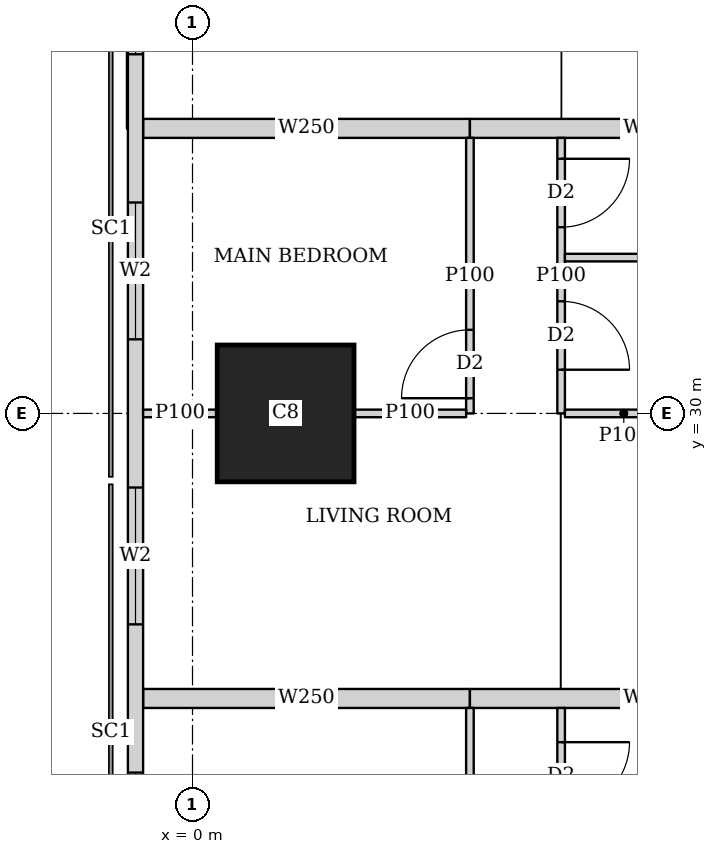
"""IFC4 building model, lengths in metres.
Left out: names, types, materials, properties, quantities, classifications, styles, units other than length and angle.
Written with IfcOpenShell. Run it as: python <this file> out.ifc"""

import sys

from ifc_helpers import new_model, si_unit, direction, frame, frame_2d, origin, origin_2d, place, context, subcontext, project, spatial, rectangle, extrude, element, fill, save


model = new_model("IFC4")
c1 = context("Model", 3, precision=1e-05, world=origin(), true_north=direction((0.0, 1.0)))
c2 = subcontext(c1, "Body", "Model", "MODEL_VIEW")
j1 = project(units=[si_unit("LENGTHUNIT", "METRE"), si_unit("PLANEANGLEUNIT", "RADIAN")], contexts=[c1])
p1 = place(None, origin())
s1 = spatial("IfcSite", under=j1, at=p1, CompositionType="ELEMENT")
p2 = place(p1, origin())
s2 = spatial("IfcBuilding", under=s1, at=p2, CompositionType="ELEMENT")
p3 = place(p2, frame((0.0, 0.0, 135.8)))
s3 = spatial("IfcBuildingStorey", under=s2, at=p3, CompositionType="ELEMENT", Elevation=135.8)
p4 = place(p3, frame((1.225, 30.0, 0.0), z_axis=(0.0, 0.0, 1.0), x_axis=(1.0, 0.0, 0.0)))
e1 = element("IfcColumn", 1, at=p4, inside=s3, PredefinedType="COLUMN", context=c2, shape_type="SweptSolid", body=[
    extrude(rectangle(XDim=1.8, YDim=1.8, at=origin_2d()), origin(), (0.0, 0.0, 1.0), 3.75),
])
p5 = place(p3, frame((-0.75, 42.837, 0.0), z_axis=(0.0, 0.0, 1.0), x_axis=(0.0, -1.0, 0.0)))
e2 = element("IfcWall", 2, at=p5, inside=s3, PredefinedType="SOLIDWALL", context=c2, shape_type="SweptSolid", body=[
    extrude(rectangle(XDim=40.674, YDim=0.2, at=frame_2d((20.337, 0.0))), origin(), (0.0, 0.0, 1.0), 3.5),
])
p6 = place(p5, frame((1.78, 0.0, 0.9)))
e3 = element("IfcOpeningElement", 3, at=p6, cuts=e2, PredefinedType="OPENING", context=c2, shape_type="SweptSolid", body=[
    extrude(rectangle(XDim=1.8, YDim=1.5, at=frame_2d((0.9, 0.75))), frame((0.0, 0.11, 0.0), z_axis=(0.0, -1.0, 0.0), x_axis=(1.0, 0.0, 0.0)), (0.0, 0.0, 1.0), 0.22),
])
p7 = place(p5, frame((6.312, 0.0, 0.9)))
e4 = element("IfcOpeningElement", 4, at=p7, cuts=e2, PredefinedType="OPENING", context=c2, shape_type="SweptSolid", body=[
    extrude(rectangle(XDim=1.8, YDim=1.5, at=frame_2d((0.9, 0.75))), frame((0.0, 0.11, 0.0), z_axis=(0.0, -1.0, 0.0), x_axis=(1.0, 0.0, 0.0)), (0.0, 0.0, 1.0), 0.22),
])
p8 = place(p5, frame((10.062, 0.0, 0.9)))
e5 = element("IfcOpeningElement", 5, at=p8, cuts=e2, PredefinedType="OPENING", context=c2, shape_type="SweptSolid", body=[
    extrude(rectangle(XDim=1.8, YDim=1.5, at=frame_2d((0.9, 0.75))), frame((0.0, 0.11, 0.0), z_axis=(0.0, -1.0, 0.0), x_axis=(1.0, 0.0, 0.0)), (0.0, 0.0, 1.0), 0.22),
])
p9 = place(p5, frame((13.812, 0.0, 0.9)))
e6 = element("IfcOpeningElement", 6, at=p9, cuts=e2, PredefinedType="OPENING", context=c2, shape_type="SweptSolid", body=[
    extrude(rectangle(XDim=1.8, YDim=1.5, at=frame_2d((0.9, 0.75))), frame((0.0, 0.11, 0.0), z_axis=(0.0, -1.0, 0.0), x_axis=(1.0, 0.0, 0.0)), (0.0, 0.0, 1.0), 0.22),
])
p10 = place(p5, frame((17.562, 0.0, 0.9)))
e7 = element("IfcOpeningElement", 7, at=p10, cuts=e2, PredefinedType="OPENING", context=c2, shape_type="SweptSolid", body=[
    extrude(rectangle(XDim=1.8, YDim=1.5, at=frame_2d((0.9, 0.75))), frame((0.0, 0.11, 0.0), z_axis=(0.0, -1.0, 0.0), x_axis=(1.0, 0.0, 0.0)), (0.0, 0.0, 1.0), 0.22),
])
p11 = place(p5, frame((21.312, 0.0, 0.9)))
e8 = element("IfcOpeningElement", 8, at=p11, cuts=e2, PredefinedType="OPENING", context=c2, shape_type="SweptSolid", body=[
    extrude(rectangle(XDim=1.8, YDim=1.5, at=frame_2d((0.9, 0.75))), frame((0.0, 0.11, 0.0), z_axis=(0.0, -1.0, 0.0), x_axis=(1.0, 0.0, 0.0)), (0.0, 0.0, 1.0), 0.22),
])
p12 = place(p5, frame((25.062, 0.0, 0.9)))
e9 = element("IfcOpeningElement", 9, at=p12, cuts=e2, PredefinedType="OPENING", context=c2, shape_type="SweptSolid", body=[
    extrude(rectangle(XDim=1.8, YDim=1.5, at=frame_2d((0.9, 0.75))), frame((0.0, 0.11, 0.0), z_axis=(0.0, -1.0, 0.0), x_axis=(1.0, 0.0, 0.0)), (0.0, 0.0, 1.0), 0.22),
])
p13 = place(p5, frame((28.812, 0.0, 0.9)))
e10 = element("IfcOpeningElement", 10, at=p13, cuts=e2, PredefinedType="OPENING", context=c2, shape_type="SweptSolid", body=[
    extrude(rectangle(XDim=1.8, YDim=1.5, at=frame_2d((0.9, 0.75))), frame((0.0, 0.11, 0.0), z_axis=(0.0, -1.0, 0.0), x_axis=(1.0, 0.0, 0.0)), (0.0, 0.0, 1.0), 0.22),
])
p14 = place(p5, frame((32.562, 0.0, 0.9)))
e11 = element("IfcOpeningElement", 11, at=p14, cuts=e2, PredefinedType="OPENING", context=c2, shape_type="SweptSolid", body=[
    extrude(rectangle(XDim=1.8, YDim=1.5, at=frame_2d((0.9, 0.75))), frame((0.0, 0.11, 0.0), z_axis=(0.0, -1.0, 0.0), x_axis=(1.0, 0.0, 0.0)), (0.0, 0.0, 1.0), 0.22),
])
p15 = place(p5, frame((37.094, 0.0, 0.9)))
e12 = element("IfcOpeningElement", 12, at=p15, cuts=e2, PredefinedType="OPENING", context=c2, shape_type="SweptSolid", body=[
    extrude(rectangle(XDim=1.8, YDim=1.5, at=frame_2d((0.9, 0.75))), frame((0.0, 0.11, 0.0), z_axis=(0.0, -1.0, 0.0), x_axis=(1.0, 0.0, 0.0)), (0.0, 0.0, 1.0), 0.22),
])
p16 = place(p3, frame((3.65, 15.0, 0.0), z_axis=(0.0, 0.0, 1.0), x_axis=(0.0, 1.0, 0.0)))
e13 = element("IfcWall", 13, at=p16, inside=s3, PredefinedType="PARTITIONING", context=c2, shape_type="SweptSolid", body=[
    extrude(rectangle(XDim=11.125, YDim=0.1, at=frame_2d((5.562, 0.0))), origin(), (0.0, 0.0, 1.0), 3.5),
])
p17 = place(p16, frame((0.2, 0.0, 0.0)))
e14 = element("IfcOpeningElement", 14, at=p17, cuts=e13, PredefinedType="OPENING", context=c2, shape_type="SweptSolid", body=[
    extrude(rectangle(XDim=0.9, YDim=2.1, at=frame_2d((0.45, 1.05))), frame((0.0, 0.06, 0.0), z_axis=(0.0, -1.0, 0.0), x_axis=(1.0, 0.0, 0.0)), (0.0, 0.0, 1.0), 0.12),
])
p18 = place(p16, frame((3.95, 0.0, 0.0)))
e15 = element("IfcOpeningElement", 15, at=p18, cuts=e13, PredefinedType="OPENING", context=c2, shape_type="SweptSolid", body=[
    extrude(rectangle(XDim=0.9, YDim=2.1, at=frame_2d((0.45, 1.05))), frame((0.0, 0.06, 0.0), z_axis=(0.0, -1.0, 0.0), x_axis=(1.0, 0.0, 0.0)), (0.0, 0.0, 1.0), 0.12),
])
p19 = place(p16, frame((7.7, 0.0, 0.0)))
e16 = element("IfcOpeningElement", 16, at=p19, cuts=e13, PredefinedType="OPENING", context=c2, shape_type="SweptSolid", body=[
    extrude(rectangle(XDim=0.9, YDim=2.1, at=frame_2d((0.45, 1.05))), frame((0.0, 0.06, 0.0), z_axis=(0.0, -1.0, 0.0), x_axis=(1.0, 0.0, 0.0)), (0.0, 0.0, 1.0), 0.12),
])
p20 = place(p3, frame((4.85, 15.0, 0.0), z_axis=(0.0, 0.0, 1.0), x_axis=(0.0, 1.0, 0.0)))
e17 = element("IfcWall", 17, at=p20, inside=s3, PredefinedType="PARTITIONING", context=c2, shape_type="SweptSolid", body=[
    extrude(rectangle(XDim=11.125, YDim=0.1, at=frame_2d((5.562, 0.0))), origin(), (0.0, 0.0, 1.0), 3.5),
])
p21 = place(p20, frame((0.575, 0.0, 0.0)))
e18 = element("IfcOpeningElement", 18, at=p21, cuts=e17, PredefinedType="OPENING", context=c2, shape_type="SweptSolid", body=[
    extrude(rectangle(XDim=0.9, YDim=2.1, at=frame_2d((0.45, 1.05))), frame((0.0, 0.06, 0.0), z_axis=(0.0, -1.0, 0.0), x_axis=(1.0, 0.0, 0.0)), (0.0, 0.0, 1.0), 0.12),
])
p22 = place(p20, frame((4.1, 0.0, 0.0)))
e19 = element("IfcOpeningElement", 19, at=p22, cuts=e17, PredefinedType="OPENING", context=c2, shape_type="SweptSolid", body=[
    extrude(rectangle(XDim=0.9, YDim=2.1, at=frame_2d((0.45, 1.05))), frame((0.0, 0.06, 0.0), z_axis=(0.0, -1.0, 0.0), x_axis=(1.0, 0.0, 0.0)), (0.0, 0.0, 1.0), 0.12),
])
p23 = place(p20, frame((7.9, 0.0, 0.0)))
e20 = element("IfcOpeningElement", 20, at=p23, cuts=e17, PredefinedType="OPENING", context=c2, shape_type="SweptSolid", body=[
    extrude(rectangle(XDim=0.9, YDim=2.1, at=frame_2d((0.45, 1.05))), frame((0.0, 0.06, 0.0), z_axis=(0.0, -1.0, 0.0), x_axis=(1.0, 0.0, 0.0)), (0.0, 0.0, 1.0), 0.12),
])
p24 = place(p20, frame((2.45, 0.0, 0.0)))
e21 = element("IfcOpeningElement", 21, at=p24, cuts=e17, PredefinedType="OPENING", context=c2, shape_type="SweptSolid", body=[
    extrude(rectangle(XDim=0.9, YDim=2.1, at=frame_2d((0.45, 1.05))), frame((0.0, 0.06, 0.0), z_axis=(0.0, -1.0, 0.0), x_axis=(1.0, 0.0, 0.0)), (0.0, 0.0, 1.0), 0.12),
])
p25 = place(p20, frame((5.975, 0.0, 0.0)))
e22 = element("IfcOpeningElement", 22, at=p25, cuts=e17, PredefinedType="OPENING", context=c2, shape_type="SweptSolid", body=[
    extrude(rectangle(XDim=0.9, YDim=2.1, at=frame_2d((0.45, 1.05))), frame((0.0, 0.06, 0.0), z_axis=(0.0, -1.0, 0.0), x_axis=(1.0, 0.0, 0.0)), (0.0, 0.0, 1.0), 0.12),
])
p26 = place(p20, frame((9.775, 0.0, 0.0)))
e23 = element("IfcOpeningElement", 23, at=p26, cuts=e17, PredefinedType="OPENING", context=c2, shape_type="SweptSolid", body=[
    extrude(rectangle(XDim=0.9, YDim=2.1, at=frame_2d((0.45, 1.05))), frame((0.0, 0.06, 0.0), z_axis=(0.0, -1.0, 0.0), x_axis=(1.0, 0.0, 0.0)), (0.0, 0.0, 1.0), 0.12),
])
p27 = place(p3, frame((3.65, 30.0, 0.0), z_axis=(0.0, 0.0, 1.0), x_axis=(0.0, 1.0, 0.0)))
e24 = element("IfcWall", 24, at=p27, inside=s3, PredefinedType="PARTITIONING", context=c2, shape_type="SweptSolid", body=[
    extrude(rectangle(XDim=3.625, YDim=0.1, at=frame_2d((1.812, 0.0))), origin(), (0.0, 0.0, 1.0), 3.5),
])
p28 = place(p27, frame((0.2, 0.0, 0.0)))
e25 = element("IfcOpeningElement", 25, at=p28, cuts=e24, PredefinedType="OPENING", context=c2, shape_type="SweptSolid", body=[
    extrude(rectangle(XDim=0.9, YDim=2.1, at=frame_2d((0.45, 1.05))), frame((0.0, 0.06, 0.0), z_axis=(0.0, -1.0, 0.0), x_axis=(1.0, 0.0, 0.0)), (0.0, 0.0, 1.0), 0.12),
])
p29 = place(p3, frame((4.85, 30.0, 0.0), z_axis=(0.0, 0.0, 1.0), x_axis=(0.0, 1.0, 0.0)))
e26 = element("IfcWall", 26, at=p29, inside=s3, PredefinedType="PARTITIONING", context=c2, shape_type="SweptSolid", body=[
    extrude(rectangle(XDim=3.625, YDim=0.1, at=frame_2d((1.812, 0.0))), origin(), (0.0, 0.0, 1.0), 3.5),
])
p30 = place(p29, frame((0.575, 0.0, 0.0)))
e27 = element("IfcOpeningElement", 27, at=p30, cuts=e26, PredefinedType="OPENING", context=c2, shape_type="SweptSolid", body=[
    extrude(rectangle(XDim=0.9, YDim=2.1, at=frame_2d((0.45, 1.05))), frame((0.0, 0.06, 0.0), z_axis=(0.0, -1.0, 0.0), x_axis=(1.0, 0.0, 0.0)), (0.0, 0.0, 1.0), 0.12),
])
p31 = place(p29, frame((2.45, 0.0, 0.0)))
e28 = element("IfcOpeningElement", 28, at=p31, cuts=e26, PredefinedType="OPENING", context=c2, shape_type="SweptSolid", body=[
    extrude(rectangle(XDim=0.9, YDim=2.1, at=frame_2d((0.45, 1.05))), frame((0.0, 0.06, 0.0), z_axis=(0.0, -1.0, 0.0), x_axis=(1.0, 0.0, 0.0)), (0.0, 0.0, 1.0), 0.12),
])
p32 = place(p3, frame((-0.65, 30.0, 0.0), z_axis=(0.0, 0.0, 1.0), x_axis=(1.0, 0.0, 0.0)))
e29 = element("IfcWall", 29, at=p32, inside=s3, PredefinedType="PARTITIONING", context=c2, shape_type="SweptSolid", body=[
    extrude(rectangle(XDim=0.974, YDim=0.1, at=frame_2d((0.487, 0.0))), origin(), (0.0, 0.0, 1.0), 3.5),
])
p33 = place(p3, frame((2.126, 30.0, 0.0), z_axis=(0.0, 0.0, 1.0), x_axis=(1.0, 0.0, 0.0)))
e30 = element("IfcWall", 30, at=p33, inside=s3, PredefinedType="PARTITIONING", context=c2, shape_type="SweptSolid", body=[
    extrude(rectangle(XDim=1.474, YDim=0.1, at=frame_2d((0.737, 0.0))), origin(), (0.0, 0.0, 1.0), 3.5),
])
p34 = place(p3, frame((4.9, 30.0, 0.0), z_axis=(0.0, 0.0, 1.0), x_axis=(1.0, 0.0, 0.0)))
e31 = element("IfcWall", 31, at=p34, inside=s3, PredefinedType="PARTITIONING", context=c2, shape_type="SweptSolid", body=[
    extrude(rectangle(XDim=1.549, YDim=0.1, at=frame_2d((0.774, 0.0))), origin(), (0.0, 0.0, 1.0), 3.5),
])
p35 = place(p3, frame((4.9, 32.05, 0.0), z_axis=(0.0, 0.0, 1.0), x_axis=(1.0, 0.0, 0.0)))
e32 = element("IfcWall", 32, at=p35, inside=s3, PredefinedType="PARTITIONING", context=c2, shape_type="SweptSolid", body=[
    extrude(rectangle(XDim=3.525, YDim=0.1, at=frame_2d((1.763, 0.0))), origin(), (0.0, 0.0, 1.0), 3.5),
])
p36 = place(p3, frame((-0.65, 26.25, 0.0), z_axis=(0.0, 0.0, 1.0), x_axis=(1.0, 0.0, 0.0)))
e33 = element("IfcWall", 33, at=p36, inside=s3, PredefinedType="SOLIDWALL", context=c2, shape_type="SweptSolid", body=[
    extrude(rectangle(XDim=4.3, YDim=0.25, at=frame_2d((2.15, 0.0))), origin(), (0.0, 0.0, 1.0), 2.1),
])
p37 = place(p3, frame((3.65, 26.25, 0.0), z_axis=(0.0, 0.0, 1.0), x_axis=(1.0, 0.0, 0.0)))
e34 = element("IfcWall", 34, at=p37, inside=s3, PredefinedType="SOLIDWALL", context=c2, shape_type="SweptSolid", body=[
    extrude(rectangle(XDim=4.775, YDim=0.25, at=frame_2d((2.388, 0.0))), origin(), (0.0, 0.0, 1.0), 3.5),
])
p38 = place(p3, frame((-0.65, 33.75, 0.0), z_axis=(0.0, 0.0, 1.0), x_axis=(1.0, 0.0, 0.0)))
e35 = element("IfcWall", 35, at=p38, inside=s3, PredefinedType="SOLIDWALL", context=c2, shape_type="SweptSolid", body=[
    extrude(rectangle(XDim=4.3, YDim=0.25, at=frame_2d((2.15, 0.0))), origin(), (0.0, 0.0, 1.0), 2.1),
])
p39 = place(p3, frame((3.65, 33.75, 0.0), z_axis=(0.0, 0.0, 1.0), x_axis=(1.0, 0.0, 0.0)))
e36 = element("IfcWall", 36, at=p39, inside=s3, PredefinedType="SOLIDWALL", context=c2, shape_type="SweptSolid", body=[
    extrude(rectangle(XDim=4.775, YDim=0.25, at=frame_2d((2.388, 0.0))), origin(), (0.0, 0.0, 1.0), 3.5),
])
p40 = place(p7, origin())
e37 = element("IfcWindow", 37, at=p40, inside=s3, PartitioningType="SINGLE_PANEL", PredefinedType="WINDOW", context=c2, shape_type="SweptSolid", body=[
    extrude(rectangle(XDim=1.8, YDim=1.5, at=frame_2d((0.9, 0.75))), frame((0.0, 0.03, 0.0), z_axis=(0.0, -1.0, 0.0), x_axis=(1.0, 0.0, 0.0)), (0.0, 0.0, 1.0), 0.06),
])
fill(e4, e37)
p41 = place(p8, origin())
e38 = element("IfcWindow", 38, at=p41, inside=s3, PartitioningType="SINGLE_PANEL", PredefinedType="WINDOW", context=c2, shape_type="SweptSolid", body=[
    extrude(rectangle(XDim=1.8, YDim=1.5, at=frame_2d((0.9, 0.75))), frame((0.0, 0.03, 0.0), z_axis=(0.0, -1.0, 0.0), x_axis=(1.0, 0.0, 0.0)), (0.0, 0.0, 1.0), 0.06),
])
fill(e5, e38)
p42 = place(p9, origin())
e39 = element("IfcWindow", 39, at=p42, inside=s3, PartitioningType="SINGLE_PANEL", PredefinedType="WINDOW", context=c2, shape_type="SweptSolid", body=[
    extrude(rectangle(XDim=1.8, YDim=1.5, at=frame_2d((0.9, 0.75))), frame((0.0, 0.03, 0.0), z_axis=(0.0, -1.0, 0.0), x_axis=(1.0, 0.0, 0.0)), (0.0, 0.0, 1.0), 0.06),
])
fill(e6, e39)
p43 = place(p10, origin())
e40 = element("IfcWindow", 40, at=p43, inside=s3, PartitioningType="SINGLE_PANEL", PredefinedType="WINDOW", context=c2, shape_type="SweptSolid", body=[
    extrude(rectangle(XDim=1.8, YDim=1.5, at=frame_2d((0.9, 0.75))), frame((0.0, 0.03, 0.0), z_axis=(0.0, -1.0, 0.0), x_axis=(1.0, 0.0, 0.0)), (0.0, 0.0, 1.0), 0.06),
])
fill(e7, e40)
p44 = place(p26, origin())
e41 = element("IfcDoor", 41, at=p44, inside=s3, OperationType="SINGLE_SWING_LEFT", PredefinedType="DOOR", context=c2, shape_type="SweptSolid", body=[
    extrude(rectangle(XDim=0.9, YDim=2.1, at=frame_2d((0.45, 1.05))), frame((0.0, 0.025, 0.0), z_axis=(0.0, -1.0, 0.0), x_axis=(1.0, 0.0, 0.0)), (0.0, 0.0, 1.0), 0.05),
])
fill(e23, e41)
p45 = place(p28, origin())
e42 = element("IfcDoor", 42, at=p45, inside=s3, OperationType="SINGLE_SWING_LEFT", PredefinedType="DOOR", context=c2, shape_type="SweptSolid", body=[
    extrude(rectangle(XDim=0.9, YDim=2.1, at=frame_2d((0.45, 1.05))), frame((0.0, 0.025, 0.0), z_axis=(0.0, -1.0, 0.0), x_axis=(1.0, 0.0, 0.0)), (0.0, 0.0, 1.0), 0.05),
])
fill(e25, e42)
p46 = place(p30, origin())
e43 = element("IfcDoor", 43, at=p46, inside=s3, OperationType="SINGLE_SWING_RIGHT", PredefinedType="DOOR", context=c2, shape_type="SweptSolid", body=[
    extrude(rectangle(XDim=0.9, YDim=2.1, at=frame_2d((0.45, 1.05))), frame((0.0, 0.025, 0.0), z_axis=(0.0, -1.0, 0.0), x_axis=(1.0, 0.0, 0.0)), (0.0, 0.0, 1.0), 0.05),
])
fill(e27, e43)
p47 = place(p31, origin())
e44 = element("IfcDoor", 44, at=p47, inside=s3, OperationType="SINGLE_SWING_LEFT", PredefinedType="DOOR", context=c2, shape_type="SweptSolid", body=[
    extrude(rectangle(XDim=0.9, YDim=2.1, at=frame_2d((0.45, 1.05))), frame((0.0, 0.025, 0.0), z_axis=(0.0, -1.0, 0.0), x_axis=(1.0, 0.0, 0.0)), (0.0, 0.0, 1.0), 0.05),
])
fill(e28, e44)
save(model, sys.argv[1])
